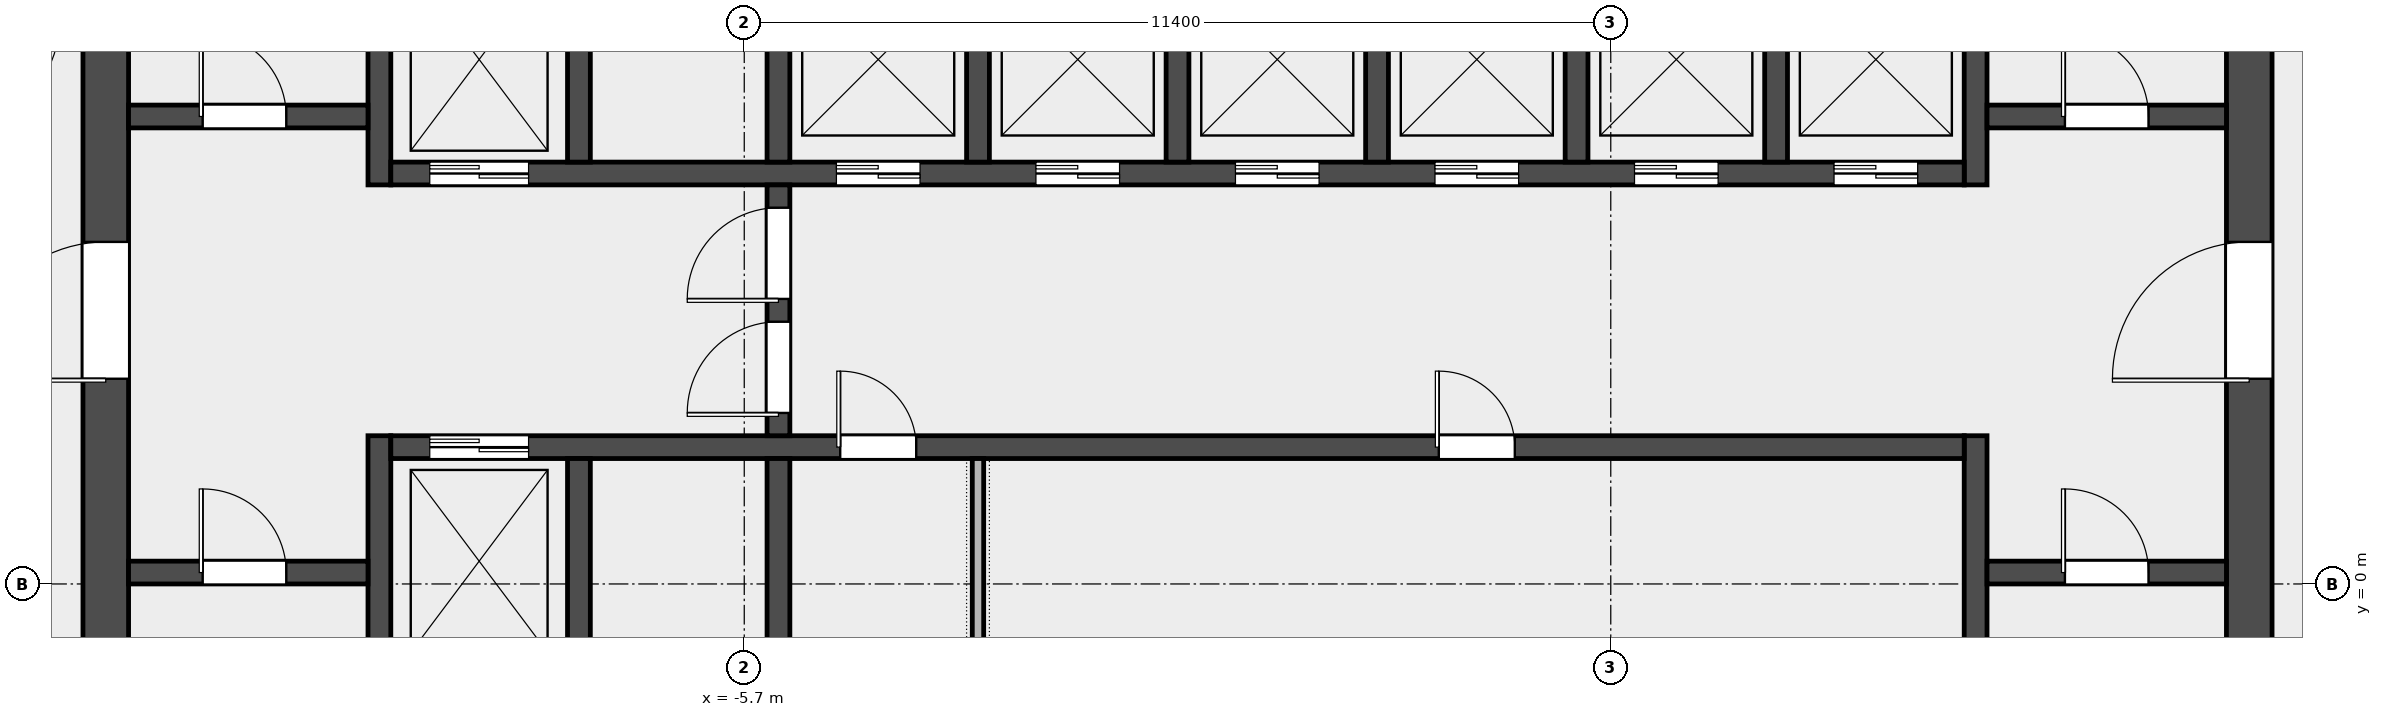
"""IFC4 building model, lengths in metres.
Left out: names, types, materials, properties, quantities, classifications, styles, units other than length and angle.
Written with IfcOpenShell. Run it as: python <this file> out.ifc"""

import sys

from ifc_helpers import new_model, si_unit, direction, frame, frame_2d, origin, place, context, subcontext, project, spatial, rectangle, extrude, element, fill, save


model = new_model("IFC4")
c1 = context("Model", 3, precision=1e-05, world=origin(), true_north=direction((0.0, 1.0)))
c2 = subcontext(c1, "Body", "Model", "MODEL_VIEW")
j1 = project(units=[si_unit("LENGTHUNIT", "METRE"), si_unit("PLANEANGLEUNIT", "RADIAN")], contexts=[c1])
p1 = place(None, origin())
s1 = spatial("IfcSite", under=j1, at=p1, CompositionType="ELEMENT")
p2 = place(p1, origin())
s2 = spatial("IfcBuilding", under=s1, at=p2, CompositionType="ELEMENT")
p3 = place(p2, frame((0.0, 0.0, 243.0)))
s3 = spatial("IfcBuildingStorey", under=s2, at=p3, CompositionType="ELEMENT", Elevation=243.0)
p4 = place(p3, frame((-14.1, -6.6, 0.0), z_axis=(0.0, 0.0, 1.0), x_axis=(0.0, 1.0, 0.0)))
e1 = element("IfcWall", 1, at=p4, inside=s3, PredefinedType="SHEAR", context=c2, shape_type="SweptSolid", body=[
    extrude(rectangle(XDim=19.5, YDim=0.6, at=frame_2d((9.75, 0.0))), origin(), (0.0, 0.0, 1.0), 3.7),
])
p5 = place(p4, frame((9.3, 0.0, 0.0)))
e2 = element("IfcOpeningElement", 2, at=p5, cuts=e1, PredefinedType="OPENING", context=c2, shape_type="SweptSolid", body=[
    extrude(rectangle(XDim=1.8, YDim=2.1, at=frame_2d((0.9, 1.05))), frame((0.0, 0.312, 0.0), z_axis=(0.0, -1.0, 0.0), x_axis=(1.0, 0.0, 0.0)), (0.0, 0.0, 1.0), 0.624),
])
p6 = place(p3, frame((14.1, -6.6, 0.0), z_axis=(0.0, 0.0, 1.0), x_axis=(0.0, 1.0, 0.0)))
e3 = element("IfcWall", 3, at=p6, inside=s3, PredefinedType="SHEAR", context=c2, shape_type="SweptSolid", body=[
    extrude(rectangle(XDim=19.5, YDim=0.6, at=frame_2d((9.75, 0.0))), origin(), (0.0, 0.0, 1.0), 3.7),
])
p7 = place(p6, frame((9.3, 0.0, 0.0)))
e4 = element("IfcOpeningElement", 4, at=p7, cuts=e3, PredefinedType="OPENING", context=c2, shape_type="SweptSolid", body=[
    extrude(rectangle(XDim=1.8, YDim=2.1, at=frame_2d((0.9, 1.05))), frame((0.0, 0.312, 0.0), z_axis=(0.0, -1.0, 0.0), x_axis=(1.0, 0.0, 0.0)), (0.0, 0.0, 1.0), 0.624),
])
p8 = place(p3, frame((-10.5, -6.6, 0.0), z_axis=(0.0, 0.0, 1.0), x_axis=(0.0, 1.0, 0.0)))
e5 = element("IfcWall", 5, at=p8, inside=s3, PredefinedType="SHEAR", context=c2, shape_type="SweptSolid", body=[
    extrude(rectangle(XDim=8.55, YDim=0.3, at=frame_2d((4.275, 0.0))), origin(), (0.0, 0.0, 1.0), 3.7),
])
p9 = place(p3, frame((-10.5, 5.25, 0.0), z_axis=(0.0, 0.0, 1.0), x_axis=(0.0, 1.0, 0.0)))
e6 = element("IfcWall", 6, at=p9, inside=s3, PredefinedType="SHEAR", context=c2, shape_type="SweptSolid", body=[
    extrude(rectangle(XDim=7.65, YDim=0.3, at=frame_2d((3.825, 0.0))), origin(), (0.0, 0.0, 1.0), 3.7),
])
p10 = place(p3, frame((10.5, -6.6, 0.0), z_axis=(0.0, 0.0, 1.0), x_axis=(0.0, 1.0, 0.0)))
e7 = element("IfcWall", 7, at=p10, inside=s3, PredefinedType="SHEAR", context=c2, shape_type="SweptSolid", body=[
    extrude(rectangle(XDim=8.55, YDim=0.3, at=frame_2d((4.275, 0.0))), origin(), (0.0, 0.0, 1.0), 3.7),
])
p11 = place(p3, frame((10.5, 5.25, 0.0), z_axis=(0.0, 0.0, 1.0), x_axis=(0.0, 1.0, 0.0)))
e8 = element("IfcWall", 8, at=p11, inside=s3, PredefinedType="SHEAR", context=c2, shape_type="SweptSolid", body=[
    extrude(rectangle(XDim=7.65, YDim=0.3, at=frame_2d((3.825, 0.0))), origin(), (0.0, 0.0, 1.0), 3.7),
])
p12 = place(p3, frame((-13.8, 0.15, 0.0), z_axis=(0.0, 0.0, 1.0), x_axis=(1.0, 0.0, 0.0)))
e9 = element("IfcWall", 9, at=p12, inside=s3, PredefinedType="SOLIDWALL", context=c2, shape_type="SweptSolid", body=[
    extrude(rectangle(XDim=3.15, YDim=0.3, at=frame_2d((1.575, 0.0))), origin(), (0.0, 0.0, 1.0), 3.7),
])
p13 = place(p12, frame((0.975, 0.0, 0.0)))
e10 = element("IfcOpeningElement", 10, at=p13, cuts=e9, PredefinedType="OPENING", context=c2, shape_type="SweptSolid", body=[
    extrude(rectangle(XDim=1.1, YDim=2.1, at=frame_2d((0.55, 1.05))), frame((0.0, 0.162, 0.0), z_axis=(0.0, -1.0, 0.0), x_axis=(1.0, 0.0, 0.0)), (0.0, 0.0, 1.0), 0.324),
])
p14 = place(p3, frame((-13.8, 6.15, 0.0), z_axis=(0.0, 0.0, 1.0), x_axis=(1.0, 0.0, 0.0)))
e11 = element("IfcWall", 11, at=p14, inside=s3, PredefinedType="SOLIDWALL", context=c2, shape_type="SweptSolid", body=[
    extrude(rectangle(XDim=3.15, YDim=0.3, at=frame_2d((1.575, 0.0))), origin(), (0.0, 0.0, 1.0), 3.7),
])
p15 = place(p14, frame((0.975, 0.0, 0.0)))
e12 = element("IfcOpeningElement", 12, at=p15, cuts=e11, PredefinedType="OPENING", context=c2, shape_type="SweptSolid", body=[
    extrude(rectangle(XDim=1.1, YDim=2.1, at=frame_2d((0.55, 1.05))), frame((0.0, 0.162, 0.0), z_axis=(0.0, -1.0, 0.0), x_axis=(1.0, 0.0, 0.0)), (0.0, 0.0, 1.0), 0.324),
])
p16 = place(p3, frame((10.65, 0.15, 0.0), z_axis=(0.0, 0.0, 1.0), x_axis=(1.0, 0.0, 0.0)))
e13 = element("IfcWall", 13, at=p16, inside=s3, PredefinedType="SOLIDWALL", context=c2, shape_type="SweptSolid", body=[
    extrude(rectangle(XDim=3.15, YDim=0.3, at=frame_2d((1.575, 0.0))), origin(), (0.0, 0.0, 1.0), 3.7),
])
p17 = place(p16, frame((1.025, 0.0, 0.0)))
e14 = element("IfcOpeningElement", 14, at=p17, cuts=e13, PredefinedType="OPENING", context=c2, shape_type="SweptSolid", body=[
    extrude(rectangle(XDim=1.1, YDim=2.1, at=frame_2d((0.55, 1.05))), frame((0.0, 0.162, 0.0), z_axis=(0.0, -1.0, 0.0), x_axis=(1.0, 0.0, 0.0)), (0.0, 0.0, 1.0), 0.324),
])
p18 = place(p3, frame((10.65, 6.15, 0.0), z_axis=(0.0, 0.0, 1.0), x_axis=(1.0, 0.0, 0.0)))
e15 = element("IfcWall", 15, at=p18, inside=s3, PredefinedType="SOLIDWALL", context=c2, shape_type="SweptSolid", body=[
    extrude(rectangle(XDim=3.15, YDim=0.3, at=frame_2d((1.575, 0.0))), origin(), (0.0, 0.0, 1.0), 3.7),
])
p19 = place(p18, frame((1.025, 0.0, 0.0)))
e16 = element("IfcOpeningElement", 16, at=p19, cuts=e15, PredefinedType="OPENING", context=c2, shape_type="SweptSolid", body=[
    extrude(rectangle(XDim=1.1, YDim=2.1, at=frame_2d((0.55, 1.05))), frame((0.0, 0.162, 0.0), z_axis=(0.0, -1.0, 0.0), x_axis=(1.0, 0.0, 0.0)), (0.0, 0.0, 1.0), 0.324),
])
p20 = place(p3, frame((-10.35, 1.8, 0.0), z_axis=(0.0, 0.0, 1.0), x_axis=(1.0, 0.0, 0.0)))
e17 = element("IfcWall", 17, at=p20, inside=s3, PredefinedType="SOLIDWALL", context=c2, shape_type="SweptSolid", body=[
    extrude(rectangle(XDim=20.7, YDim=0.3, at=frame_2d((10.35, 0.0))), origin(), (0.0, 0.0, 1.0), 3.7),
])
p21 = place(p20, frame((0.512, 0.0, 0.0)))
e18 = element("IfcOpeningElement", 18, at=p21, cuts=e17, PredefinedType="OPENING", context=c2, shape_type="SweptSolid", body=[
    extrude(rectangle(XDim=1.3, YDim=2.1, at=frame_2d((0.65, 1.05))), frame((0.0, 0.162, 0.0), z_axis=(0.0, -1.0, 0.0), x_axis=(1.0, 0.0, 0.0)), (0.0, 0.0, 1.0), 0.324),
])
p22 = place(p20, frame((5.913, 0.0, 0.0)))
e19 = element("IfcOpeningElement", 19, at=p22, cuts=e17, PredefinedType="OPENING", context=c2, shape_type="SweptSolid", body=[
    extrude(rectangle(XDim=1.0, YDim=2.1, at=frame_2d((0.5, 1.05))), frame((0.0, 0.162, 0.0), z_axis=(0.0, -1.0, 0.0), x_axis=(1.0, 0.0, 0.0)), (0.0, 0.0, 1.0), 0.324),
])
p23 = place(p20, frame((13.788, 0.0, 0.0)))
e20 = element("IfcOpeningElement", 20, at=p23, cuts=e17, PredefinedType="OPENING", context=c2, shape_type="SweptSolid", body=[
    extrude(rectangle(XDim=1.0, YDim=2.1, at=frame_2d((0.5, 1.05))), frame((0.0, 0.162, 0.0), z_axis=(0.0, -1.0, 0.0), x_axis=(1.0, 0.0, 0.0)), (0.0, 0.0, 1.0), 0.324),
])
p24 = place(p3, frame((-10.35, 5.4, 0.0), z_axis=(0.0, 0.0, 1.0), x_axis=(1.0, 0.0, 0.0)))
e21 = element("IfcWall", 21, at=p24, inside=s3, PredefinedType="SOLIDWALL", context=c2, shape_type="SweptSolid", body=[
    extrude(rectangle(XDim=20.7, YDim=0.3, at=frame_2d((10.35, 0.0))), origin(), (0.0, 0.0, 1.0), 3.7),
])
p25 = place(p24, frame((0.512, 0.0, 0.0)))
e22 = element("IfcOpeningElement", 22, at=p25, cuts=e21, PredefinedType="OPENING", context=c2, shape_type="SweptSolid", body=[
    extrude(rectangle(XDim=1.3, YDim=2.1, at=frame_2d((0.65, 1.05))), frame((0.0, 0.162, 0.0), z_axis=(0.0, -1.0, 0.0), x_axis=(1.0, 0.0, 0.0)), (0.0, 0.0, 1.0), 0.324),
])
p26 = place(p24, frame((5.863, 0.0, 0.0)))
e23 = element("IfcOpeningElement", 23, at=p26, cuts=e21, PredefinedType="OPENING", context=c2, shape_type="SweptSolid", body=[
    extrude(rectangle(XDim=1.1, YDim=2.1, at=frame_2d((0.55, 1.05))), frame((0.0, 0.162, 0.0), z_axis=(0.0, -1.0, 0.0), x_axis=(1.0, 0.0, 0.0)), (0.0, 0.0, 1.0), 0.324),
])
p27 = place(p24, frame((8.488, 0.0, 0.0)))
e24 = element("IfcOpeningElement", 24, at=p27, cuts=e21, PredefinedType="OPENING", context=c2, shape_type="SweptSolid", body=[
    extrude(rectangle(XDim=1.1, YDim=2.1, at=frame_2d((0.55, 1.05))), frame((0.0, 0.162, 0.0), z_axis=(0.0, -1.0, 0.0), x_axis=(1.0, 0.0, 0.0)), (0.0, 0.0, 1.0), 0.324),
])
p28 = place(p24, frame((11.113, 0.0, 0.0)))
e25 = element("IfcOpeningElement", 25, at=p28, cuts=e21, PredefinedType="OPENING", context=c2, shape_type="SweptSolid", body=[
    extrude(rectangle(XDim=1.1, YDim=2.1, at=frame_2d((0.55, 1.05))), frame((0.0, 0.162, 0.0), z_axis=(0.0, -1.0, 0.0), x_axis=(1.0, 0.0, 0.0)), (0.0, 0.0, 1.0), 0.324),
])
p29 = place(p24, frame((13.738, 0.0, 0.0)))
e26 = element("IfcOpeningElement", 26, at=p29, cuts=e21, PredefinedType="OPENING", context=c2, shape_type="SweptSolid", body=[
    extrude(rectangle(XDim=1.1, YDim=2.1, at=frame_2d((0.55, 1.05))), frame((0.0, 0.162, 0.0), z_axis=(0.0, -1.0, 0.0), x_axis=(1.0, 0.0, 0.0)), (0.0, 0.0, 1.0), 0.324),
])
p30 = place(p24, frame((16.363, 0.0, 0.0)))
e27 = element("IfcOpeningElement", 27, at=p30, cuts=e21, PredefinedType="OPENING", context=c2, shape_type="SweptSolid", body=[
    extrude(rectangle(XDim=1.1, YDim=2.1, at=frame_2d((0.55, 1.05))), frame((0.0, 0.162, 0.0), z_axis=(0.0, -1.0, 0.0), x_axis=(1.0, 0.0, 0.0)), (0.0, 0.0, 1.0), 0.324),
])
p31 = place(p24, frame((18.988, 0.0, 0.0)))
e28 = element("IfcOpeningElement", 28, at=p31, cuts=e21, PredefinedType="OPENING", context=c2, shape_type="SweptSolid", body=[
    extrude(rectangle(XDim=1.1, YDim=2.1, at=frame_2d((0.55, 1.05))), frame((0.0, 0.162, 0.0), z_axis=(0.0, -1.0, 0.0), x_axis=(1.0, 0.0, 0.0)), (0.0, 0.0, 1.0), 0.324),
])
for number, where, z_axis, x_axis in (
    (29, (-7.875, -1.05, 0.0), (0.0, 0.0, 1.0), (0.0, 1.0, 0.0)),
    (30, (-5.25, -1.05, 0.0), (0.0, 0.0, 1.0), (0.0, 1.0, 0.0)),
    (31, (-7.875, 5.55, 0.0), (0.0, 0.0, 1.0), (0.0, 1.0, 0.0)),
    (32, (-5.25, 5.55, 0.0), (0.0, 0.0, 1.0), (0.0, 1.0, 0.0)),
    (33, (-2.625, 5.55, 0.0), (0.0, 0.0, 1.0), (0.0, 1.0, 0.0)),
    (34, (0.0, 5.55, 0.0), (0.0, 0.0, 1.0), (0.0, 1.0, 0.0)),
    (35, (2.625, 5.55, 0.0), (0.0, 0.0, 1.0), (0.0, 1.0, 0.0)),
    (36, (5.25, 5.55, 0.0), (0.0, 0.0, 1.0), (0.0, 1.0, 0.0)),
    (37, (7.875, 5.55, 0.0), (0.0, 0.0, 1.0), (0.0, 1.0, 0.0)),
):
    element("IfcWall", number, at=place(p3, frame(where, z_axis=z_axis, x_axis=x_axis)), inside=s3, PredefinedType="SOLIDWALL", context=c2, shape_type="SweptSolid", body=[
        extrude(rectangle(XDim=2.7, YDim=0.3, at=frame_2d((1.35, 0.0))), origin(), (0.0, 0.0, 1.0), 3.7),
    ])
p32 = place(p3, frame((-5.25, 1.95, 0.0), z_axis=(0.0, 0.0, 1.0), x_axis=(0.0, 1.0, 0.0)))
e38 = element("IfcWall", 38, at=p32, inside=s3, PredefinedType="SOLIDWALL", context=c2, shape_type="SweptSolid", body=[
    extrude(rectangle(XDim=3.3, YDim=0.3, at=frame_2d((1.65, 0.0))), origin(), (0.0, 0.0, 1.0), 3.7),
])
p33 = place(p32, frame((0.3, 0.0, 0.0)))
e39 = element("IfcOpeningElement", 39, at=p33, cuts=e38, PredefinedType="OPENING", context=c2, shape_type="SweptSolid", body=[
    extrude(rectangle(XDim=1.2, YDim=2.1, at=frame_2d((0.6, 1.05))), frame((0.0, 0.162, 0.0), z_axis=(0.0, -1.0, 0.0), x_axis=(1.0, 0.0, 0.0)), (0.0, 0.0, 1.0), 0.324),
])
p34 = place(p32, frame((1.8, 0.0, 0.0)))
e40 = element("IfcOpeningElement", 40, at=p34, cuts=e38, PredefinedType="OPENING", context=c2, shape_type="SweptSolid", body=[
    extrude(rectangle(XDim=1.2, YDim=2.1, at=frame_2d((0.6, 1.05))), frame((0.0, 0.162, 0.0), z_axis=(0.0, -1.0, 0.0), x_axis=(1.0, 0.0, 0.0)), (0.0, 0.0, 1.0), 0.324),
])
p35 = place(p3, frame((-2.625, -1.05, 0.0), z_axis=(0.0, 0.0, 1.0), x_axis=(0.0, 1.0, 0.0)))
e41 = element("IfcWall", 41, at=p35, inside=s3, PredefinedType="PARTITIONING", context=c2, shape_type="SweptSolid", body=[
    extrude(rectangle(XDim=2.7, YDim=0.15, at=frame_2d((1.35, 0.0))), origin(), (0.0, 0.0, 1.0), 3.7),
])
p36 = place(p13, origin())
e42 = element("IfcDoor", 42, at=p36, inside=s3, OperationType="SINGLE_SWING_LEFT", PredefinedType="DOOR", context=c2, shape_type="SweptSolid", body=[
    extrude(rectangle(XDim=1.1, YDim=2.1, at=frame_2d((0.55, 1.05))), frame((0.0, 0.025, 0.0), z_axis=(0.0, -1.0, 0.0), x_axis=(1.0, 0.0, 0.0)), (0.0, 0.0, 1.0), 0.05),
])
fill(e10, e42)
p37 = place(p15, origin())
e43 = element("IfcDoor", 43, at=p37, inside=s3, OperationType="SINGLE_SWING_LEFT", PredefinedType="DOOR", context=c2, shape_type="SweptSolid", body=[
    extrude(rectangle(XDim=1.1, YDim=2.1, at=frame_2d((0.55, 1.05))), frame((0.0, 0.025, 0.0), z_axis=(0.0, -1.0, 0.0), x_axis=(1.0, 0.0, 0.0)), (0.0, 0.0, 1.0), 0.05),
])
fill(e12, e43)
p38 = place(p17, origin())
e44 = element("IfcDoor", 44, at=p38, inside=s3, OperationType="SINGLE_SWING_RIGHT", PredefinedType="DOOR", context=c2, shape_type="SweptSolid", body=[
    extrude(rectangle(XDim=1.1, YDim=2.1, at=frame_2d((0.55, 1.05))), frame((0.0, 0.025, 0.0), z_axis=(0.0, -1.0, 0.0), x_axis=(1.0, 0.0, 0.0)), (0.0, 0.0, 1.0), 0.05),
])
fill(e14, e44)
p39 = place(p19, origin())
e45 = element("IfcDoor", 45, at=p39, inside=s3, OperationType="SINGLE_SWING_RIGHT", PredefinedType="DOOR", context=c2, shape_type="SweptSolid", body=[
    extrude(rectangle(XDim=1.1, YDim=2.1, at=frame_2d((0.55, 1.05))), frame((0.0, 0.025, 0.0), z_axis=(0.0, -1.0, 0.0), x_axis=(1.0, 0.0, 0.0)), (0.0, 0.0, 1.0), 0.05),
])
fill(e16, e45)
p40 = place(p5, origin())
e46 = element("IfcDoor", 46, at=p40, inside=s3, OperationType="DOUBLE_DOOR_SINGLE_SWING", PredefinedType="DOOR", context=c2, shape_type="SweptSolid", body=[
    extrude(rectangle(XDim=1.8, YDim=2.1, at=frame_2d((0.9, 1.05))), frame((0.0, 0.025, 0.0), z_axis=(0.0, -1.0, 0.0), x_axis=(1.0, 0.0, 0.0)), (0.0, 0.0, 1.0), 0.05),
])
fill(e2, e46)
p41 = place(p7, origin())
e47 = element("IfcDoor", 47, at=p41, inside=s3, OperationType="DOUBLE_DOOR_SINGLE_SWING", PredefinedType="DOOR", context=c2, shape_type="SweptSolid", body=[
    extrude(rectangle(XDim=1.8, YDim=2.1, at=frame_2d((0.9, 1.05))), frame((0.0, 0.025, 0.0), z_axis=(0.0, -1.0, 0.0), x_axis=(1.0, 0.0, 0.0)), (0.0, 0.0, 1.0), 0.05),
])
fill(e4, e47)
p42 = place(p33, origin())
e48 = element("IfcDoor", 48, at=p42, inside=s3, OperationType="SINGLE_SWING_LEFT", PredefinedType="DOOR", context=c2, shape_type="SweptSolid", body=[
    extrude(rectangle(XDim=1.2, YDim=2.1, at=frame_2d((0.6, 1.05))), frame((0.0, 0.025, 0.0), z_axis=(0.0, -1.0, 0.0), x_axis=(1.0, 0.0, 0.0)), (0.0, 0.0, 1.0), 0.05),
])
fill(e39, e48)
p43 = place(p34, origin())
e49 = element("IfcDoor", 49, at=p43, inside=s3, OperationType="SINGLE_SWING_RIGHT", PredefinedType="DOOR", context=c2, shape_type="SweptSolid", body=[
    extrude(rectangle(XDim=1.2, YDim=2.1, at=frame_2d((0.6, 1.05))), frame((0.0, 0.025, 0.0), z_axis=(0.0, -1.0, 0.0), x_axis=(1.0, 0.0, 0.0)), (0.0, 0.0, 1.0), 0.05),
])
fill(e40, e49)
p44 = place(p21, origin())
e50 = element("IfcDoor", 50, at=p44, inside=s3, OperationType="DOUBLE_DOOR_SLIDING", PredefinedType="DOOR", context=c2, shape_type="SweptSolid", body=[
    extrude(rectangle(XDim=1.3, YDim=2.1, at=frame_2d((0.65, 1.05))), frame((0.0, 0.025, 0.0), z_axis=(0.0, -1.0, 0.0), x_axis=(1.0, 0.0, 0.0)), (0.0, 0.0, 1.0), 0.05),
])
fill(e18, e50)
p45 = place(p25, origin())
e51 = element("IfcDoor", 51, at=p45, inside=s3, OperationType="DOUBLE_DOOR_SLIDING", PredefinedType="DOOR", context=c2, shape_type="SweptSolid", body=[
    extrude(rectangle(XDim=1.3, YDim=2.1, at=frame_2d((0.65, 1.05))), frame((0.0, 0.025, 0.0), z_axis=(0.0, -1.0, 0.0), x_axis=(1.0, 0.0, 0.0)), (0.0, 0.0, 1.0), 0.05),
])
fill(e22, e51)
p46 = place(p26, origin())
e52 = element("IfcDoor", 52, at=p46, inside=s3, OperationType="DOUBLE_DOOR_SLIDING", PredefinedType="DOOR", context=c2, shape_type="SweptSolid", body=[
    extrude(rectangle(XDim=1.1, YDim=2.1, at=frame_2d((0.55, 1.05))), frame((0.0, 0.025, 0.0), z_axis=(0.0, -1.0, 0.0), x_axis=(1.0, 0.0, 0.0)), (0.0, 0.0, 1.0), 0.05),
])
fill(e23, e52)
p47 = place(p27, origin())
e53 = element("IfcDoor", 53, at=p47, inside=s3, OperationType="DOUBLE_DOOR_SLIDING", PredefinedType="DOOR", context=c2, shape_type="SweptSolid", body=[
    extrude(rectangle(XDim=1.1, YDim=2.1, at=frame_2d((0.55, 1.05))), frame((0.0, 0.025, 0.0), z_axis=(0.0, -1.0, 0.0), x_axis=(1.0, 0.0, 0.0)), (0.0, 0.0, 1.0), 0.05),
])
fill(e24, e53)
p48 = place(p28, origin())
e54 = element("IfcDoor", 54, at=p48, inside=s3, OperationType="DOUBLE_DOOR_SLIDING", PredefinedType="DOOR", context=c2, shape_type="SweptSolid", body=[
    extrude(rectangle(XDim=1.1, YDim=2.1, at=frame_2d((0.55, 1.05))), frame((0.0, 0.025, 0.0), z_axis=(0.0, -1.0, 0.0), x_axis=(1.0, 0.0, 0.0)), (0.0, 0.0, 1.0), 0.05),
])
fill(e25, e54)
p49 = place(p29, origin())
e55 = element("IfcDoor", 55, at=p49, inside=s3, OperationType="DOUBLE_DOOR_SLIDING", PredefinedType="DOOR", context=c2, shape_type="SweptSolid", body=[
    extrude(rectangle(XDim=1.1, YDim=2.1, at=frame_2d((0.55, 1.05))), frame((0.0, 0.025, 0.0), z_axis=(0.0, -1.0, 0.0), x_axis=(1.0, 0.0, 0.0)), (0.0, 0.0, 1.0), 0.05),
])
fill(e26, e55)
p50 = place(p30, origin())
e56 = element("IfcDoor", 56, at=p50, inside=s3, OperationType="DOUBLE_DOOR_SLIDING", PredefinedType="DOOR", context=c2, shape_type="SweptSolid", body=[
    extrude(rectangle(XDim=1.1, YDim=2.1, at=frame_2d((0.55, 1.05))), frame((0.0, 0.025, 0.0), z_axis=(0.0, -1.0, 0.0), x_axis=(1.0, 0.0, 0.0)), (0.0, 0.0, 1.0), 0.05),
])
fill(e27, e56)
p51 = place(p31, origin())
e57 = element("IfcDoor", 57, at=p51, inside=s3, OperationType="DOUBLE_DOOR_SLIDING", PredefinedType="DOOR", context=c2, shape_type="SweptSolid", body=[
    extrude(rectangle(XDim=1.1, YDim=2.1, at=frame_2d((0.55, 1.05))), frame((0.0, 0.025, 0.0), z_axis=(0.0, -1.0, 0.0), x_axis=(1.0, 0.0, 0.0)), (0.0, 0.0, 1.0), 0.05),
])
fill(e28, e57)
p52 = place(p22, origin())
e58 = element("IfcDoor", 58, at=p52, inside=s3, OperationType="SINGLE_SWING_LEFT", PredefinedType="DOOR", context=c2, shape_type="SweptSolid", body=[
    extrude(rectangle(XDim=1.0, YDim=2.1, at=frame_2d((0.5, 1.05))), frame((0.0, 0.025, 0.0), z_axis=(0.0, -1.0, 0.0), x_axis=(1.0, 0.0, 0.0)), (0.0, 0.0, 1.0), 0.05),
])
fill(e19, e58)
p53 = place(p23, origin())
e59 = element("IfcDoor", 59, at=p53, inside=s3, OperationType="SINGLE_SWING_LEFT", PredefinedType="DOOR", context=c2, shape_type="SweptSolid", body=[
    extrude(rectangle(XDim=1.0, YDim=2.1, at=frame_2d((0.5, 1.05))), frame((0.0, 0.025, 0.0), z_axis=(0.0, -1.0, 0.0), x_axis=(1.0, 0.0, 0.0)), (0.0, 0.0, 1.0), 0.05),
])
fill(e20, e59)
save(model, sys.argv[1])
